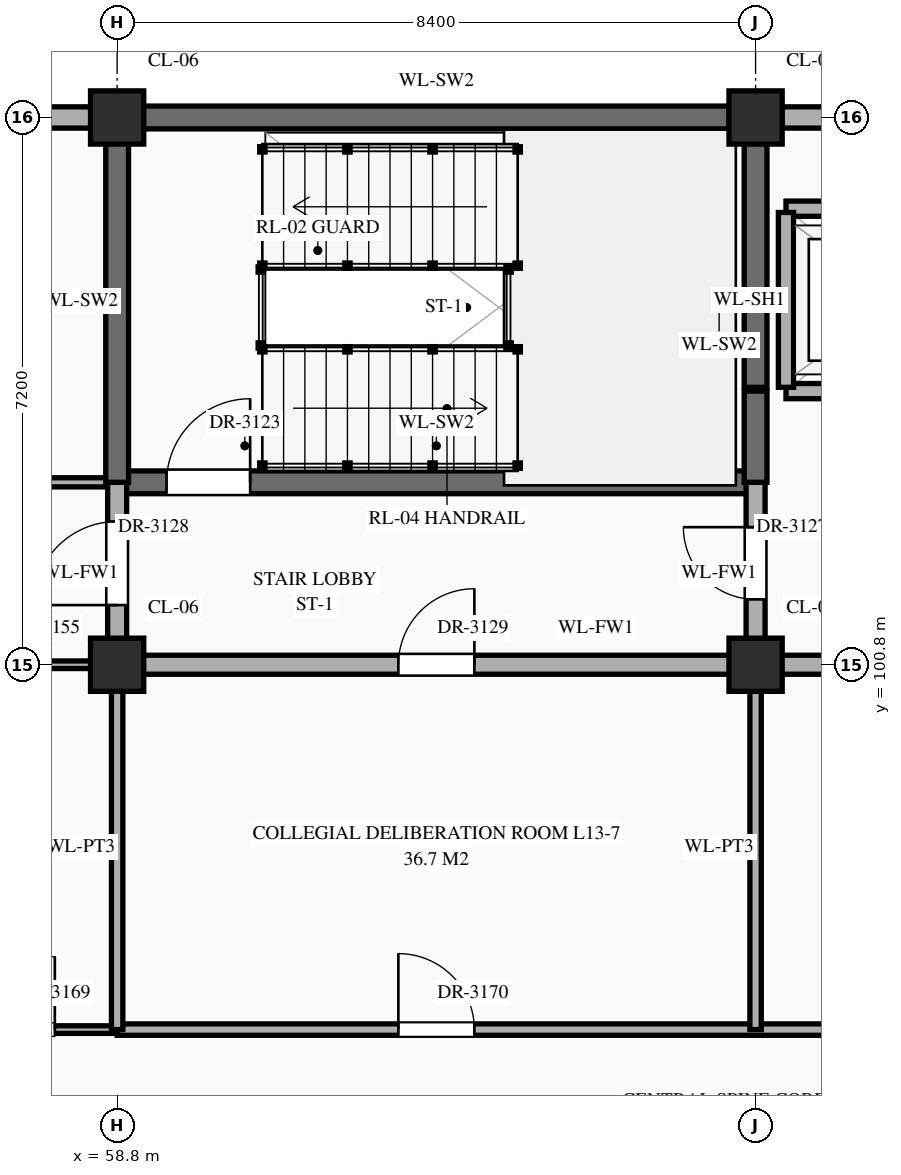
"""IFC4 building model, lengths in metres.
Left out: names, types, materials, properties, quantities, classifications, styles, units other than length and angle.
Written with IfcOpenShell. Run it as: python <this file> out.ifc"""

import sys

from ifc_helpers import new_model, si_unit, direction, frame, frame_2d, origin, origin_2d, place, context, subcontext, project, spatial, rectangle, extrude, element, fill, save


model = new_model("IFC4")
c1 = context("Model", 3, precision=1e-05, world=origin(), true_north=direction((0.0, 1.0)))
c2 = subcontext(c1, "Body", "Model", "MODEL_VIEW")
j1 = project(units=[si_unit("LENGTHUNIT", "METRE"), si_unit("PLANEANGLEUNIT", "RADIAN")], contexts=[c1])
p1 = place(None, origin())
s1 = spatial("IfcSite", under=j1, at=p1, CompositionType="ELEMENT")
p2 = place(p1, origin())
s2 = spatial("IfcBuilding", under=s1, at=p2, CompositionType="ELEMENT")
p3 = place(p2, frame((0.0, 0.0, 56.1)))
s3 = spatial("IfcBuildingStorey", under=s2, at=p3, CompositionType="ELEMENT", Elevation=56.1)
for number, where, z_axis, x_axis in (
    (1, (58.8, 100.8, 0.0), (0.0, 0.0, 1.0), (1.0, 0.0, 0.0)),
    (2, (58.8, 108.0, 0.0), (0.0, 0.0, 1.0), (1.0, 0.0, 0.0)),
    (3, (67.2, 100.8, 0.0), (0.0, 0.0, 1.0), (1.0, 0.0, 0.0)),
    (4, (67.2, 108.0, 0.0), (0.0, 0.0, 1.0), (1.0, 0.0, 0.0)),
):
    element("IfcColumn", number, at=place(p3, frame(where, z_axis=z_axis, x_axis=x_axis)), inside=s3, PredefinedType="COLUMN", context=c2, shape_type="SweptSolid", body=[
        extrude(rectangle(XDim=0.7, YDim=0.7, at=origin_2d()), origin(), (0.0, 0.0, 1.0), 4.2),
    ])
p4 = place(p3, frame((50.745, 108.0, 0.0), z_axis=(0.0, 0.0, 1.0), x_axis=(1.0, 0.0, 0.0)))
e5 = element("IfcWall", 5, at=p4, inside=s3, PredefinedType="STANDARD", context=c2, shape_type="SweptSolid", body=[
    extrude(rectangle(XDim=7.71, YDim=0.28, at=frame_2d((3.855, 0.0))), origin(), (0.0, 0.0, 1.0), 3.2),
])
p5 = place(p4, frame((5.33, 0.0, 0.55)))
e6 = element("IfcOpeningElement", 6, at=p5, cuts=e5, PredefinedType="OPENING", context=c2, shape_type="SweptSolid", body=[
    extrude(rectangle(XDim=1.05, YDim=2.12, at=frame_2d((0.525, 1.06))), frame((0.0, 0.152, 0.0), z_axis=(0.0, -1.0, 0.0), x_axis=(1.0, 0.0, 0.0)), (0.0, 0.0, 1.0), 0.304),
])
p6 = place(p3, frame((59.145, 108.0, 0.0), z_axis=(0.0, 0.0, 1.0), x_axis=(1.0, 0.0, 0.0)))
e7 = element("IfcWall", 7, at=p6, inside=s3, PredefinedType="SHEAR", context=c2, shape_type="SweptSolid", body=[
    extrude(rectangle(XDim=7.71, YDim=0.3, at=frame_2d((3.855, 0.0))), origin(), (0.0, 0.0, 1.0), 3.96),
])
p7 = place(p3, frame((67.545, 108.0, 0.0), z_axis=(0.0, 0.0, 1.0), x_axis=(1.0, 0.0, 0.0)))
e8 = element("IfcWall", 8, at=p7, inside=s3, PredefinedType="STANDARD", context=c2, shape_type="SweptSolid", body=[
    extrude(rectangle(XDim=7.71, YDim=0.28, at=frame_2d((3.855, 0.0))), origin(), (0.0, 0.0, 1.0), 3.31),
])
p8 = place(p3, frame((50.44, 96.0, 0.0), z_axis=(0.0, 0.0, 1.0), x_axis=(1.0, 0.0, 0.0)))
e9 = element("IfcWall", 9, at=p8, inside=s3, PredefinedType="STANDARD", context=c2, shape_type="SweptSolid", body=[
    extrude(rectangle(XDim=8.36, YDim=0.1, at=frame_2d((4.18, 0.0))), origin(), (0.0, 0.0, 1.0), 3.85),
])
p9 = place(p8, frame((1.25, 0.0, 0.0)))
e10 = element("IfcOpeningElement", 10, at=p9, cuts=e9, PredefinedType="OPENING", context=c2, shape_type="SweptSolid", body=[
    extrude(rectangle(XDim=0.86, YDim=2.1, at=frame_2d((0.43, 1.05))), frame((0.0, 0.062, 0.0), z_axis=(0.0, -1.0, 0.0), x_axis=(1.0, 0.0, 0.0)), (0.0, 0.0, 1.0), 0.124),
])
p10 = place(p8, frame((4.1, 0.0, 0.0)))
e11 = element("IfcOpeningElement", 11, at=p10, cuts=e9, PredefinedType="OPENING", context=c2, shape_type="SweptSolid", body=[
    extrude(rectangle(XDim=0.92, YDim=2.15, at=frame_2d((0.46, 1.075))), frame((0.0, 0.062, 0.0), z_axis=(0.0, -1.0, 0.0), x_axis=(1.0, 0.0, 0.0)), (0.0, 0.0, 1.0), 0.124),
])
p11 = place(p8, frame((6.58, 0.0, 0.0)))
e12 = element("IfcOpeningElement", 12, at=p11, cuts=e9, PredefinedType="OPENING", context=c2, shape_type="SweptSolid", body=[
    extrude(rectangle(XDim=0.96, YDim=2.2, at=frame_2d((0.48, 1.1))), frame((0.0, 0.062, 0.0), z_axis=(0.0, -1.0, 0.0), x_axis=(1.0, 0.0, 0.0)), (0.0, 0.0, 1.0), 0.124),
])
p12 = place(p3, frame((58.8, 96.0, 0.0), z_axis=(0.0, 0.0, 1.0), x_axis=(1.0, 0.0, 0.0)))
e13 = element("IfcWall", 13, at=p12, inside=s3, PredefinedType="STANDARD", context=c2, shape_type="SweptSolid", body=[
    extrude(rectangle(XDim=25.2, YDim=0.15, at=frame_2d((12.6, 0.0))), origin(), (0.0, 0.0, 1.0), 3.96),
])
p13 = place(p12, frame((3.7, 0.0, 0.0)))
e14 = element("IfcOpeningElement", 14, at=p13, cuts=e13, PredefinedType="OPENING", context=c2, shape_type="SweptSolid", body=[
    extrude(rectangle(XDim=1.0, YDim=2.25, at=frame_2d((0.5, 1.125))), frame((0.0, 0.087, 0.0), z_axis=(0.0, -1.0, 0.0), x_axis=(1.0, 0.0, 0.0)), (0.0, 0.0, 1.0), 0.174),
])
p14 = place(p12, frame((12.08, 0.0, 0.0)))
e15 = element("IfcOpeningElement", 15, at=p14, cuts=e13, PredefinedType="OPENING", context=c2, shape_type="SweptSolid", body=[
    extrude(rectangle(XDim=1.04, YDim=2.2, at=frame_2d((0.52, 1.1))), frame((0.0, 0.087, 0.0), z_axis=(0.0, -1.0, 0.0), x_axis=(1.0, 0.0, 0.0)), (0.0, 0.0, 1.0), 0.174),
])
p15 = place(p12, frame((20.46, 0.0, 0.0)))
e16 = element("IfcOpeningElement", 16, at=p15, cuts=e13, PredefinedType="OPENING", context=c2, shape_type="SweptSolid", body=[
    extrude(rectangle(XDim=1.08, YDim=2.25, at=frame_2d((0.54, 1.125))), frame((0.0, 0.087, 0.0), z_axis=(0.0, -1.0, 0.0), x_axis=(1.0, 0.0, 0.0)), (0.0, 0.0, 1.0), 0.174),
])
p16 = place(p3, frame((50.44, 100.8, 0.0), z_axis=(0.0, 0.0, 1.0), x_axis=(1.0, 0.0, 0.0)))
e17 = element("IfcWall", 17, at=p16, inside=s3, PredefinedType="STANDARD", context=c2, shape_type="SweptSolid", body=[
    extrude(rectangle(XDim=8.36, YDim=0.1, at=frame_2d((4.18, 0.0))), origin(), (0.0, 0.0, 1.0), 3.0),
])
p17 = place(p16, frame((1.295, 0.0, 0.0)))
e18 = element("IfcOpeningElement", 18, at=p17, cuts=e17, PredefinedType="OPENING", context=c2, shape_type="SweptSolid", body=[
    extrude(rectangle(XDim=1.0, YDim=2.25, at=frame_2d((0.5, 1.125))), frame((0.0, 0.062, 0.0), z_axis=(0.0, -1.0, 0.0), x_axis=(1.0, 0.0, 0.0)), (0.0, 0.0, 1.0), 0.124),
])
p18 = place(p16, frame((4.04, 0.0, 0.0)))
e19 = element("IfcOpeningElement", 19, at=p18, cuts=e17, PredefinedType="OPENING", context=c2, shape_type="SweptSolid", body=[
    extrude(rectangle(XDim=1.04, YDim=2.2, at=frame_2d((0.52, 1.1))), frame((0.0, 0.062, 0.0), z_axis=(0.0, -1.0, 0.0), x_axis=(1.0, 0.0, 0.0)), (0.0, 0.0, 1.0), 0.124),
])
p19 = place(p16, frame((6.385, 0.0, 0.0)))
e20 = element("IfcOpeningElement", 20, at=p19, cuts=e17, PredefinedType="OPENING", context=c2, shape_type="SweptSolid", body=[
    extrude(rectangle(XDim=1.08, YDim=2.25, at=frame_2d((0.54, 1.125))), frame((0.0, 0.062, 0.0), z_axis=(0.0, -1.0, 0.0), x_axis=(1.0, 0.0, 0.0)), (0.0, 0.0, 1.0), 0.124),
])
p20 = place(p3, frame((58.8, 100.8, 0.0), z_axis=(0.0, 0.0, 1.0), x_axis=(1.0, 0.0, 0.0)))
e21 = element("IfcWall", 21, at=p20, inside=s3, PredefinedType="STANDARD", context=c2, shape_type="SweptSolid", body=[
    extrude(rectangle(XDim=12.6, YDim=0.25, at=frame_2d((6.3, 0.0))), origin(), (0.0, 0.0, 1.0), 3.11),
])
p21 = place(p20, frame((3.7, 0.0, 0.0)))
e22 = element("IfcOpeningElement", 22, at=p21, cuts=e21, PredefinedType="OPENING", context=c2, shape_type="SweptSolid", body=[
    extrude(rectangle(XDim=1.0, YDim=2.2, at=frame_2d((0.5, 1.1))), frame((0.0, 0.137, 0.0), z_axis=(0.0, -1.0, 0.0), x_axis=(1.0, 0.0, 0.0)), (0.0, 0.0, 1.0), 0.274),
])
p22 = place(p3, frame((50.44, 103.2, 0.0), z_axis=(0.0, 0.0, 1.0), x_axis=(1.0, 0.0, 0.0)))
e23 = element("IfcWall", 23, at=p22, inside=s3, PredefinedType="STANDARD", context=c2, shape_type="SweptSolid", body=[
    extrude(rectangle(XDim=8.36, YDim=0.12, at=frame_2d((4.18, 0.0))), origin(), (0.0, 0.0, 1.0), 3.85),
])
p23 = place(p22, frame((3.7, 0.0, 0.0)))
e24 = element("IfcOpeningElement", 24, at=p23, cuts=e23, PredefinedType="OPENING", context=c2, shape_type="SweptSolid", body=[
    extrude(rectangle(XDim=0.96, YDim=2.2, at=frame_2d((0.48, 1.1))), frame((0.0, 0.072, 0.0), z_axis=(0.0, -1.0, 0.0), x_axis=(1.0, 0.0, 0.0)), (0.0, 0.0, 1.0), 0.144),
])
p24 = place(p3, frame((58.8, 103.2, 0.0), z_axis=(0.0, 0.0, 1.0), x_axis=(1.0, 0.0, 0.0)))
e25 = element("IfcWall", 25, at=p24, inside=s3, PredefinedType="SHEAR", context=c2, shape_type="SweptSolid", body=[
    extrude(rectangle(XDim=8.4, YDim=0.3, at=frame_2d((4.2, 0.0))), origin(), (0.0, 0.0, 1.0), 3.96),
])
p25 = place(p24, frame((0.65, 0.0, 0.0)))
e26 = element("IfcOpeningElement", 26, at=p25, cuts=e25, PredefinedType="OPENING", context=c2, shape_type="SweptSolid", body=[
    extrude(rectangle(XDim=1.1, YDim=2.2, at=frame_2d((0.55, 1.1))), frame((0.0, 0.162, 0.0), z_axis=(0.0, -1.0, 0.0), x_axis=(1.0, 0.0, 0.0)), (0.0, 0.0, 1.0), 0.324),
])
p26 = place(p3, frame((67.6, 104.4, 0.0), z_axis=(0.0, 0.0, 1.0), x_axis=(1.0, 0.0, 0.0)))
e27 = element("IfcWall", 27, at=p26, inside=s3, PredefinedType="STANDARD", context=c2, shape_type="SweptSolid", body=[
    extrude(rectangle(XDim=3.0, YDim=0.2, at=frame_2d((1.5, 0.0))), origin(), (0.0, 0.0, 1.0), 3.96),
])
p27 = place(p26, frame((0.9, 0.0, 0.0)))
e28 = element("IfcOpeningElement", 28, at=p27, cuts=e27, PredefinedType="OPENING", context=c2, shape_type="SweptSolid", body=[
    extrude(rectangle(XDim=1.2, YDim=2.15, at=frame_2d((0.6, 1.075))), frame((0.0, 0.112, 0.0), z_axis=(0.0, -1.0, 0.0), x_axis=(1.0, 0.0, 0.0)), (0.0, 0.0, 1.0), 0.224),
])
p28 = place(p3, frame((67.6, 106.8, 0.0), z_axis=(0.0, 0.0, 1.0), x_axis=(1.0, 0.0, 0.0)))
e29 = element("IfcWall", 29, at=p28, inside=s3, PredefinedType="STANDARD", context=c2, shape_type="SweptSolid", body=[
    extrude(rectangle(XDim=3.0, YDim=0.2, at=frame_2d((1.5, 0.0))), origin(), (0.0, 0.0, 1.0), 3.96),
])
p29 = place(p3, frame((58.8, 96.0, 0.0), z_axis=(0.0, 0.0, 1.0), x_axis=(0.0, 1.0, 0.0)))
e30 = element("IfcWall", 30, at=p29, inside=s3, PredefinedType="STANDARD", context=c2, shape_type="SweptSolid", body=[
    extrude(rectangle(XDim=4.8, YDim=0.15, at=frame_2d((2.4, 0.0))), origin(), (0.0, 0.0, 1.0), 3.1),
])
p30 = place(p3, frame((58.8, 100.8, 0.0), z_axis=(0.0, 0.0, 1.0), x_axis=(0.0, 1.0, 0.0)))
e31 = element("IfcWall", 31, at=p30, inside=s3, PredefinedType="STANDARD", context=c2, shape_type="SweptSolid", body=[
    extrude(rectangle(XDim=2.4, YDim=0.25, at=frame_2d((1.2, 0.0))), origin(), (0.0, 0.0, 1.0), 3.1),
])
p31 = place(p30, frame((0.785, 0.0, 0.0)))
e32 = element("IfcOpeningElement", 32, at=p31, cuts=e31, PredefinedType="OPENING", context=c2, shape_type="SweptSolid", body=[
    extrude(rectangle(XDim=1.1, YDim=2.2, at=frame_2d((0.55, 1.1))), frame((0.0, 0.137, 0.0), z_axis=(0.0, -1.0, 0.0), x_axis=(1.0, 0.0, 0.0)), (0.0, 0.0, 1.0), 0.274),
])
p32 = place(p3, frame((58.8, 103.2, 0.0), z_axis=(0.0, 0.0, 1.0), x_axis=(0.0, 1.0, 0.0)))
e33 = element("IfcWall", 33, at=p32, inside=s3, PredefinedType="SHEAR", context=c2, shape_type="SweptSolid", body=[
    extrude(rectangle(XDim=4.76, YDim=0.3, at=frame_2d((2.38, 0.0))), origin(), (0.0, 0.0, 1.0), 3.85),
])
p33 = place(p3, frame((67.2, 96.0, 0.0), z_axis=(0.0, 0.0, 1.0), x_axis=(0.0, 1.0, 0.0)))
e34 = element("IfcWall", 34, at=p33, inside=s3, PredefinedType="STANDARD", context=c2, shape_type="SweptSolid", body=[
    extrude(rectangle(XDim=4.8, YDim=0.15, at=frame_2d((2.4, 0.0))), origin(), (0.0, 0.0, 1.0), 3.21),
])
p34 = place(p3, frame((67.2, 100.8, 0.0), z_axis=(0.0, 0.0, 1.0), x_axis=(0.0, 1.0, 0.0)))
e35 = element("IfcWall", 35, at=p34, inside=s3, PredefinedType="STANDARD", context=c2, shape_type="SweptSolid", body=[
    extrude(rectangle(XDim=2.4, YDim=0.25, at=frame_2d((1.2, 0.0))), origin(), (0.0, 0.0, 1.0), 3.21),
])
p35 = place(p34, frame((0.86, 0.0, 0.0)))
e36 = element("IfcOpeningElement", 36, at=p35, cuts=e35, PredefinedType="OPENING", context=c2, shape_type="SweptSolid", body=[
    extrude(rectangle(XDim=0.95, YDim=2.15, at=frame_2d((0.475, 1.075))), frame((0.0, 0.137, 0.0), z_axis=(0.0, -1.0, 0.0), x_axis=(1.0, 0.0, 0.0)), (0.0, 0.0, 1.0), 0.274),
])
p36 = place(p3, frame((67.2, 103.2, 0.0), z_axis=(0.0, 0.0, 1.0), x_axis=(0.0, 1.0, 0.0)))
e37 = element("IfcWall", 37, at=p36, inside=s3, PredefinedType="SHEAR", context=c2, shape_type="SweptSolid", body=[
    extrude(rectangle(XDim=1.2, YDim=0.3, at=frame_2d((0.6, 0.0))), origin(), (0.0, 0.0, 1.0), 3.96),
])
p37 = place(p3, frame((67.2, 104.45, 0.0), z_axis=(0.0, 0.0, 1.0), x_axis=(0.0, 1.0, 0.0)))
e38 = element("IfcWall", 38, at=p37, inside=s3, PredefinedType="SHEAR", context=c2, shape_type="SweptSolid", body=[
    extrude(rectangle(XDim=3.46, YDim=0.3, at=frame_2d((1.73, 0.0))), origin(), (0.0, 0.0, 1.0), 3.96),
])
p38 = place(p3, frame((67.6, 104.45, 0.0), z_axis=(0.0, 0.0, 1.0), x_axis=(0.0, 1.0, 0.0)))
e39 = element("IfcWall", 39, at=p38, inside=s3, PredefinedType="STANDARD", context=c2, shape_type="SweptSolid", body=[
    extrude(rectangle(XDim=2.3, YDim=0.2, at=frame_2d((1.15, 0.0))), origin(), (0.0, 0.0, 1.0), 3.96),
])
p39 = place(p25, origin())
e40 = element("IfcDoor", 40, at=p39, inside=s3, OperationType="SINGLE_SWING_RIGHT", PredefinedType="DOOR", context=c2, shape_type="SweptSolid", body=[
    extrude(rectangle(XDim=1.1, YDim=2.2, at=frame_2d((0.55, 1.1))), frame((0.0, 0.025, 0.0), z_axis=(0.0, -1.0, 0.0), x_axis=(1.0, 0.0, 0.0)), (0.0, 0.0, 1.0), 0.05),
])
fill(e26, e40)
p40 = place(p35, origin())
e41 = element("IfcDoor", 41, at=p40, inside=s3, OperationType="SINGLE_SWING_RIGHT", PredefinedType="DOOR", context=c2, shape_type="SweptSolid", body=[
    extrude(rectangle(XDim=0.95, YDim=2.15, at=frame_2d((0.475, 1.075))), frame((0.0, 0.025, 0.0), z_axis=(0.0, -1.0, 0.0), x_axis=(1.0, 0.0, 0.0)), (0.0, 0.0, 1.0), 0.05),
])
fill(e36, e41)
p41 = place(p31, origin())
e42 = element("IfcDoor", 42, at=p41, inside=s3, OperationType="SINGLE_SWING_LEFT", PredefinedType="DOOR", context=c2, shape_type="SweptSolid", body=[
    extrude(rectangle(XDim=1.1, YDim=2.2, at=frame_2d((0.55, 1.1))), frame((0.0, 0.025, 0.0), z_axis=(0.0, -1.0, 0.0), x_axis=(1.0, 0.0, 0.0)), (0.0, 0.0, 1.0), 0.05),
])
fill(e32, e42)
p42 = place(p21, origin())
e43 = element("IfcDoor", 43, at=p42, inside=s3, OperationType="SINGLE_SWING_RIGHT", PredefinedType="DOOR", context=c2, shape_type="SweptSolid", body=[
    extrude(rectangle(XDim=1.0, YDim=2.2, at=frame_2d((0.5, 1.1))), frame((0.0, 0.025, 0.0), z_axis=(0.0, -1.0, 0.0), x_axis=(1.0, 0.0, 0.0)), (0.0, 0.0, 1.0), 0.05),
])
fill(e22, e43)
p43 = place(p11, origin())
e44 = element("IfcDoor", 44, at=p43, inside=s3, OperationType="SINGLE_SWING_RIGHT", PredefinedType="DOOR", context=c2, shape_type="SweptSolid", body=[
    extrude(rectangle(XDim=0.96, YDim=2.2, at=frame_2d((0.48, 1.1))), frame((0.0, 0.025, 0.0), z_axis=(0.0, -1.0, 0.0), x_axis=(1.0, 0.0, 0.0)), (0.0, 0.0, 1.0), 0.05),
])
fill(e12, e44)
p44 = place(p13, origin())
e45 = element("IfcDoor", 45, at=p44, inside=s3, OperationType="SINGLE_SWING_LEFT", PredefinedType="DOOR", context=c2, shape_type="SweptSolid", body=[
    extrude(rectangle(XDim=1.0, YDim=2.25, at=frame_2d((0.5, 1.125))), frame((0.0, 0.025, 0.0), z_axis=(0.0, -1.0, 0.0), x_axis=(1.0, 0.0, 0.0)), (0.0, 0.0, 1.0), 0.05),
])
fill(e14, e45)
save(model, sys.argv[1])
